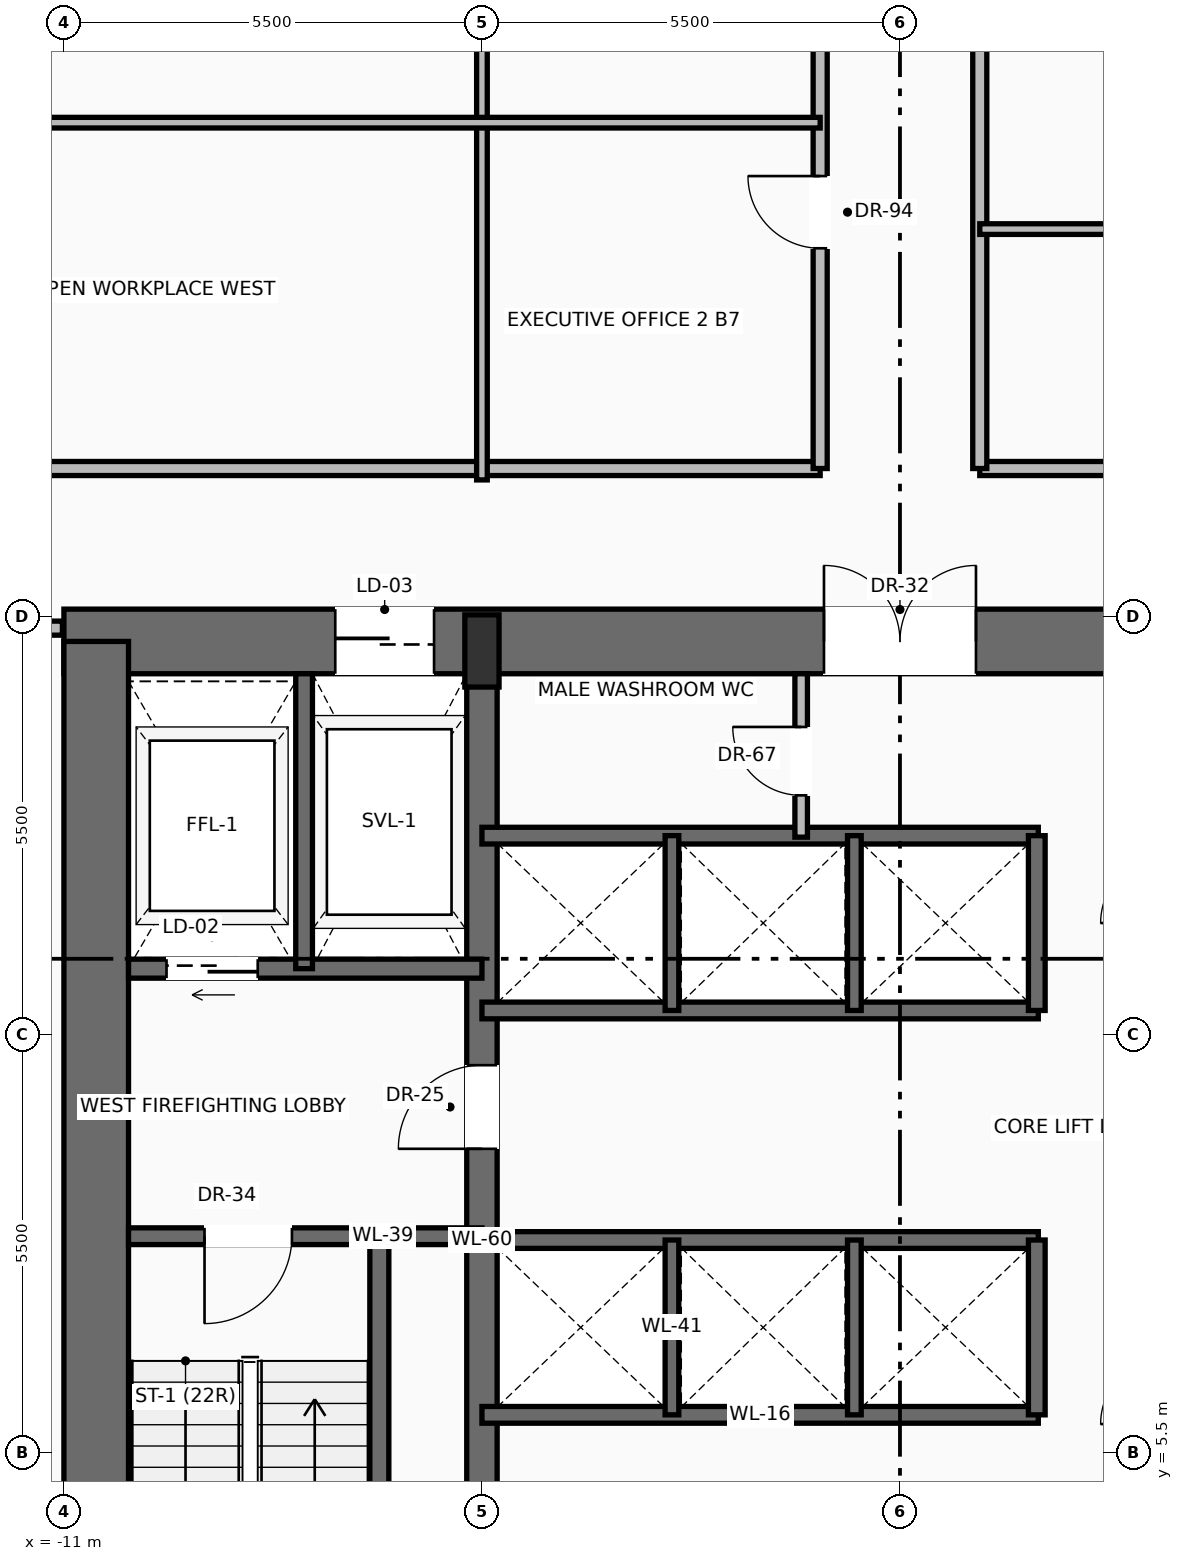
"""IFC4 building model, lengths in metres.
Left out: names, types, materials, properties, quantities, classifications, styles, units other than length and angle.
Written with IfcOpenShell. Run it as: python <this file> out.ifc"""

import sys

from ifc_helpers import new_model, si_unit, direction, frame, frame_2d, origin, origin_2d, place, context, subcontext, project, spatial, rectangle, extrude, source, transform, mapped, element, fill, save


model = new_model("IFC4")
c1 = context("Model", 3, precision=1e-05, world=origin(), true_north=direction((0.0, 1.0)))
c2 = subcontext(c1, "Body", "Model", "MODEL_VIEW")
j1 = project(units=[si_unit("LENGTHUNIT", "METRE"), si_unit("PLANEANGLEUNIT", "RADIAN")], contexts=[c1])
p1 = place(None, origin())
s1 = spatial("IfcSite", under=j1, at=p1, CompositionType="ELEMENT")
p2 = place(p1, origin())
s2 = spatial("IfcBuilding", under=s1, at=p2, CompositionType="ELEMENT")
p3 = place(p2, frame((0.0, 0.0, 27.5)))
s3 = spatial("IfcBuildingStorey", under=s2, at=p3, CompositionType="ELEMENT", Elevation=27.5)
p4 = place(p3, frame((-11.0, 16.175, 0.0), z_axis=(0.0, 0.0, 1.0), x_axis=(1.0, 0.0, 0.0)))
e1 = element("IfcWall", 1, at=p4, inside=s3, PredefinedType="SHEAR", context=c2, shape_type="SweptSolid", body=[
    extrude(rectangle(XDim=22.0, YDim=0.85, at=frame_2d((11.0, 0.0))), origin(), (0.0, 0.0, 1.0), 3.45),
])
p5 = place(p4, frame((3.57, 0.0, 0.0)))
e2 = element("IfcOpeningElement", 2, at=p5, cuts=e1, PredefinedType="OPENING", context=c2, shape_type="SweptSolid", body=[
    extrude(rectangle(XDim=1.3, YDim=2.3, at=frame_2d((0.65, 1.15))), frame((0.0, 0.435, 0.0), z_axis=(0.0, -1.0, 0.0), x_axis=(1.0, 0.0, 0.0)), (0.0, 0.0, 1.0), 0.87),
])
p6 = place(p4, frame((10.0, 0.0, 0.0)))
e3 = element("IfcOpeningElement", 3, at=p6, cuts=e1, PredefinedType="OPENING", context=c2, shape_type="SweptSolid", body=[
    extrude(rectangle(XDim=2.0, YDim=2.4, at=frame_2d((1.0, 1.2))), frame((0.0, 0.435, 0.0), z_axis=(0.0, -1.0, 0.0), x_axis=(1.0, 0.0, 0.0)), (0.0, 0.0, 1.0), 0.87),
])
p7 = place(p3, frame((-10.575, 0.425, 0.0), z_axis=(0.0, 0.0, 1.0), x_axis=(0.0, 1.0, 0.0)))
e4 = element("IfcWall", 4, at=p7, inside=s3, PredefinedType="SHEAR", context=c2, shape_type="SweptSolid", body=[
    extrude(rectangle(XDim=15.75, YDim=0.85, at=frame_2d((7.875, 0.0))), origin(), (0.0, 0.0, 1.0), 3.45),
])
p8 = place(p3, frame((-5.5, 0.425, 0.0), z_axis=(0.0, 0.0, 1.0), x_axis=(0.0, 1.0, 0.0)))
e5 = element("IfcWall", 5, at=p8, inside=s3, PredefinedType="SHEAR", context=c2, shape_type="SweptSolid", body=[
    extrude(rectangle(XDim=15.75, YDim=0.4, at=frame_2d((7.875, 0.0))), origin(), (0.0, 0.0, 1.0), 3.45),
])
p9 = place(p8, frame((9.075, 0.0, 0.0)))
e6 = element("IfcOpeningElement", 6, at=p9, cuts=e5, PredefinedType="OPENING", context=c2, shape_type="SweptSolid", body=[
    extrude(rectangle(XDim=1.1, YDim=2.2, at=frame_2d((0.55, 1.1))), frame((0.0, 0.21, 0.0), z_axis=(0.0, -1.0, 0.0), x_axis=(1.0, 0.0, 0.0)), (0.0, 0.0, 1.0), 0.42),
])
m1 = source(origin(), c2, "Body", "SweptSolid", [
    extrude(rectangle(XDim=0.45, YDim=0.95, at=origin_2d()), origin(), (0.0, 0.0, 1.0), 3.7),
])
p10 = place(p3, frame((-5.5, 16.05, 0.0), z_axis=(0.0, 0.0, 1.0), x_axis=(1.0, 0.0, 0.0)))
e7 = element("IfcColumn", 7, at=p10, inside=s3, PredefinedType="PILASTER", context=c2, shape_type="MappedRepresentation", body=[
    mapped(m1, transform((0.0, 0.0, 0.0), scale=1.0)),
])
p11 = place(p3, frame((-6.85, 0.85, 0.0), z_axis=(0.0, 0.0, 1.0), x_axis=(0.0, 1.0, 0.0)))
e8 = element("IfcWall", 8, at=p11, inside=s3, PredefinedType="SOLIDWALL", context=c2, shape_type="SweptSolid", body=[
    extrude(rectangle(XDim=7.5, YDim=0.25, at=frame_2d((3.75, 0.0))), origin(), (0.0, 0.0, 1.0), 3.45),
])
p12 = place(p3, frame((-5.5, 8.35, 0.0), z_axis=(0.0, 0.0, 1.0), x_axis=(-1.0, 0.0, 0.0)))
e9 = element("IfcWall", 9, at=p12, inside=s3, PredefinedType="SOLIDWALL", context=c2, shape_type="SweptSolid", body=[
    extrude(rectangle(XDim=4.65, YDim=0.22, at=frame_2d((2.325, 0.0))), origin(), (0.0, 0.0, 1.0), 3.45),
])
p13 = place(p12, frame((2.5, 0.0, 0.0)))
e10 = element("IfcOpeningElement", 10, at=p13, cuts=e9, PredefinedType="OPENING", context=c2, shape_type="SweptSolid", body=[
    extrude(rectangle(XDim=1.15, YDim=2.2, at=frame_2d((0.575, 1.1))), frame((0.0, 0.12, 0.0), z_axis=(0.0, -1.0, 0.0), x_axis=(1.0, 0.0, 0.0)), (0.0, 0.0, 1.0), 0.24),
])
p14 = place(p3, frame((-5.5, 11.87, 0.0), z_axis=(0.0, 0.0, 1.0), x_axis=(-1.0, 0.0, 0.0)))
e11 = element("IfcWall", 11, at=p14, inside=s3, PredefinedType="SOLIDWALL", context=c2, shape_type="SweptSolid", body=[
    extrude(rectangle(XDim=4.65, YDim=0.25, at=frame_2d((2.325, 0.0))), origin(), (0.0, 0.0, 1.0), 3.45),
])
p15 = place(p14, frame((2.95, 0.0, 0.0)))
e12 = element("IfcOpeningElement", 12, at=p15, cuts=e11, PredefinedType="OPENING", context=c2, shape_type="SweptSolid", body=[
    extrude(rectangle(XDim=1.2, YDim=2.25, at=frame_2d((0.6, 1.125))), frame((0.0, 0.135, 0.0), z_axis=(0.0, -1.0, 0.0), x_axis=(1.0, 0.0, 0.0)), (0.0, 0.0, 1.0), 0.27),
])
p16 = place(p3, frame((-7.84, 11.87, 0.0), z_axis=(0.0, 0.0, 1.0), x_axis=(0.0, 1.0, 0.0)))
e13 = element("IfcWall", 13, at=p16, inside=s3, PredefinedType="SOLIDWALL", context=c2, shape_type="SweptSolid", body=[
    extrude(rectangle(XDim=3.88, YDim=0.22, at=frame_2d((1.94, 0.0))), origin(), (0.0, 0.0, 1.0), 3.45),
])
for number, where, z_axis, x_axis in (
    (14, (-5.5, 6.0, 0.0), (0.0, 0.0, 1.0), (1.0, 0.0, 0.0)),
    (15, (-5.5, 8.3, 0.0), (0.0, 0.0, 1.0), (1.0, 0.0, 0.0)),
):
    element("IfcWall", number, at=place(p3, frame(where, z_axis=z_axis, x_axis=x_axis)), inside=s3, PredefinedType="SOLIDWALL", context=c2, shape_type="SweptSolid", body=[
        extrude(rectangle(XDim=7.32, YDim=0.22, at=frame_2d((3.66, 0.0))), origin(), (0.0, 0.0, 1.0), 3.45),
    ])
p17 = place(p3, frame((1.8, 6.0, 0.0), z_axis=(0.0, 0.0, 1.0), x_axis=(0.0, 1.0, 0.0)))
e16 = element("IfcWall", 16, at=p17, inside=s3, PredefinedType="SOLIDWALL", context=c2, shape_type="SweptSolid", body=[
    extrude(rectangle(XDim=2.3, YDim=0.22, at=frame_2d((1.15, 0.0))), origin(), (0.0, 0.0, 1.0), 3.45),
])
for number, where, z_axis, x_axis in (
    (17, (-3.0, 6.0, 0.0), (0.0, 0.0, 1.0), (0.0, 1.0, 0.0)),
    (18, (-0.6, 6.0, 0.0), (0.0, 0.0, 1.0), (0.0, 1.0, 0.0)),
):
    element("IfcWall", number, at=place(p3, frame(where, z_axis=z_axis, x_axis=x_axis)), inside=s3, PredefinedType="SOLIDWALL", context=c2, shape_type="SweptSolid", body=[
        extrude(rectangle(XDim=2.3, YDim=0.18, at=frame_2d((1.15, 0.0))), origin(), (0.0, 0.0, 1.0), 3.45),
    ])
for number, where, z_axis, x_axis in (
    (19, (-5.5, 11.32, 0.0), (0.0, 0.0, 1.0), (1.0, 0.0, 0.0)),
    (20, (-5.5, 13.62, 0.0), (0.0, 0.0, 1.0), (1.0, 0.0, 0.0)),
):
    element("IfcWall", number, at=place(p3, frame(where, z_axis=z_axis, x_axis=x_axis)), inside=s3, PredefinedType="SOLIDWALL", context=c2, shape_type="SweptSolid", body=[
        extrude(rectangle(XDim=7.32, YDim=0.22, at=frame_2d((3.66, 0.0))), origin(), (0.0, 0.0, 1.0), 3.45),
    ])
p18 = place(p3, frame((1.8, 11.32, 0.0), z_axis=(0.0, 0.0, 1.0), x_axis=(0.0, 1.0, 0.0)))
e21 = element("IfcWall", 21, at=p18, inside=s3, PredefinedType="SOLIDWALL", context=c2, shape_type="SweptSolid", body=[
    extrude(rectangle(XDim=2.3, YDim=0.22, at=frame_2d((1.15, 0.0))), origin(), (0.0, 0.0, 1.0), 3.45),
])
for number, where, z_axis, x_axis in (
    (22, (-3.0, 11.32, 0.0), (0.0, 0.0, 1.0), (0.0, 1.0, 0.0)),
    (23, (-0.6, 11.32, 0.0), (0.0, 0.0, 1.0), (0.0, 1.0, 0.0)),
):
    element("IfcWall", number, at=place(p3, frame(where, z_axis=z_axis, x_axis=x_axis)), inside=s3, PredefinedType="SOLIDWALL", context=c2, shape_type="SweptSolid", body=[
        extrude(rectangle(XDim=2.3, YDim=0.18, at=frame_2d((1.15, 0.0))), origin(), (0.0, 0.0, 1.0), 3.45),
    ])
p19 = place(p3, frame((-1.3, 13.6, 0.0), z_axis=(0.0, 0.0, 1.0), x_axis=(0.0, 1.0, 0.0)))
e24 = element("IfcWall", 24, at=p19, inside=s3, PredefinedType="PARTITIONING", context=c2, shape_type="SweptSolid", body=[
    extrude(rectangle(XDim=2.15, YDim=0.165, at=frame_2d((1.075, 0.0))), origin(), (0.0, 0.0, 1.0), 3.442),
])
p20 = place(p19, frame((0.55, 0.0, 0.0)))
e25 = element("IfcOpeningElement", 25, at=p20, cuts=e24, PredefinedType="OPENING", context=c2, shape_type="SweptSolid", body=[
    extrude(rectangle(XDim=0.9, YDim=2.1, at=frame_2d((0.45, 1.05))), frame((0.0, 0.093, 0.0), z_axis=(0.0, -1.0, 0.0), x_axis=(1.0, 0.0, 0.0)), (0.0, 0.0, 1.0), 0.185),
])
p21 = place(p3, frame((-25.333, 16.35, 0.0), z_axis=(0.0, 0.0, 1.0), x_axis=(1.0, 0.0, 0.0)))
e26 = element("IfcWall", 26, at=p21, inside=s3, PredefinedType="PARTITIONING", context=c2, shape_type="SweptSolid", body=[
    extrude(rectangle(XDim=14.313, YDim=0.185, at=frame_2d((7.157, 0.0))), origin(), (0.0, 0.0, 1.0), 2.747),
])
p22 = place(p21, frame((6.0, 0.0, 0.0)))
e27 = element("IfcOpeningElement", 27, at=p22, cuts=e26, PredefinedType="OPENING", context=c2, shape_type="SweptSolid", body=[
    extrude(rectangle(XDim=0.95, YDim=2.2, at=frame_2d((0.475, 1.1))), frame((0.0, 0.103, 0.0), z_axis=(0.0, -1.0, 0.0), x_axis=(1.0, 0.0, 0.0)), (0.0, 0.0, 1.0), 0.205),
])
p23 = place(p3, frame((-23.9, 18.45, 0.0), z_axis=(0.0, 0.0, 1.0), x_axis=(1.0, 0.0, 0.0)))
e28 = element("IfcWall", 28, at=p23, inside=s3, PredefinedType="PARTITIONING", context=c2, shape_type="SweptSolid", body=[
    extrude(rectangle(XDim=22.85, YDim=0.185, at=frame_2d((11.425, 0.0))), origin(), (0.0, 0.0, 1.0), 2.747),
])
p24 = place(p23, frame((9.842, 0.0, 0.0)))
e29 = element("IfcOpeningElement", 29, at=p24, cuts=e28, PredefinedType="OPENING", context=c2, shape_type="SweptSolid", body=[
    extrude(rectangle(XDim=0.95, YDim=2.2, at=frame_2d((0.475, 1.1))), frame((0.0, 0.103, 0.0), z_axis=(0.0, -1.0, 0.0), x_axis=(1.0, 0.0, 0.0)), (0.0, 0.0, 1.0), 0.205),
])
p25 = place(p3, frame((1.05, 18.45, 0.0), z_axis=(0.0, 0.0, 1.0), x_axis=(1.0, 0.0, 0.0)))
e30 = element("IfcWall", 30, at=p25, inside=s3, PredefinedType="PARTITIONING", context=c2, shape_type="SweptSolid", body=[
    extrude(rectangle(XDim=22.85, YDim=0.185, at=frame_2d((11.425, 0.0))), origin(), (0.0, 0.0, 1.0), 2.747),
])
p26 = place(p25, frame((12.059, 0.0, 0.0)))
e31 = element("IfcOpeningElement", 31, at=p26, cuts=e30, PredefinedType="OPENING", context=c2, shape_type="SweptSolid", body=[
    extrude(rectangle(XDim=0.95, YDim=2.2, at=frame_2d((0.475, 1.1))), frame((0.0, 0.103, 0.0), z_axis=(0.0, -1.0, 0.0), x_axis=(1.0, 0.0, 0.0)), (0.0, 0.0, 1.0), 0.205),
])
p27 = place(p3, frame((-1.05, 18.45, 0.0), z_axis=(0.0, 0.0, 1.0), x_axis=(0.0, 1.0, 0.0)))
e32 = element("IfcWall", 32, at=p27, inside=s3, PredefinedType="PARTITIONING", context=c2, shape_type="SweptSolid", body=[
    extrude(rectangle(XDim=14.05, YDim=0.185, at=frame_2d((7.025, 0.0))), origin(), (0.0, 0.0, 1.0), 2.747),
])
p28 = place(p27, frame((2.897, 0.0, 0.0)))
e33 = element("IfcOpeningElement", 33, at=p28, cuts=e32, PredefinedType="OPENING", context=c2, shape_type="SweptSolid", body=[
    extrude(rectangle(XDim=0.95, YDim=2.2, at=frame_2d((0.475, 1.1))), frame((0.0, 0.103, 0.0), z_axis=(0.0, -1.0, 0.0), x_axis=(1.0, 0.0, 0.0)), (0.0, 0.0, 1.0), 0.205),
])
p29 = place(p27, frame((8.564, 0.0, 0.0)))
e34 = element("IfcOpeningElement", 34, at=p29, cuts=e32, PredefinedType="OPENING", context=c2, shape_type="SweptSolid", body=[
    extrude(rectangle(XDim=0.95, YDim=2.2, at=frame_2d((0.475, 1.1))), frame((0.0, 0.103, 0.0), z_axis=(0.0, -1.0, 0.0), x_axis=(1.0, 0.0, 0.0)), (0.0, 0.0, 1.0), 0.205),
])
p30 = place(p3, frame((1.05, 18.45, 0.0), z_axis=(0.0, 0.0, 1.0), x_axis=(0.0, 1.0, 0.0)))
e35 = element("IfcWall", 35, at=p30, inside=s3, PredefinedType="PARTITIONING", context=c2, shape_type="SweptSolid", body=[
    extrude(rectangle(XDim=14.05, YDim=0.185, at=frame_2d((7.025, 0.0))), origin(), (0.0, 0.0, 1.0), 2.747),
])
p31 = place(p30, frame((8.498, 0.0, 0.0)))
e36 = element("IfcOpeningElement", 36, at=p31, cuts=e35, PredefinedType="OPENING", context=c2, shape_type="SweptSolid", body=[
    extrude(rectangle(XDim=0.95, YDim=2.2, at=frame_2d((0.475, 1.1))), frame((0.0, 0.103, 0.0), z_axis=(0.0, -1.0, 0.0), x_axis=(1.0, 0.0, 0.0)), (0.0, 0.0, 1.0), 0.205),
])
p32 = place(p3, frame((-5.5, 18.3, 0.0), z_axis=(0.0, 0.0, 1.0), x_axis=(0.0, 1.0, 0.0)))
e37 = element("IfcWall", 37, at=p32, inside=s3, PredefinedType="PARTITIONING", context=c2, shape_type="SweptSolid", body=[
    extrude(rectangle(XDim=13.2, YDim=0.14, at=frame_2d((6.6, 0.0))), origin(), (0.0, 0.0, 1.0), 2.747),
])
p33 = place(p3, frame((-20.796, 23.0, 0.0), z_axis=(0.0, 0.0, 1.0), x_axis=(1.0, 0.0, 0.0)))
e38 = element("IfcWall", 38, at=p33, inside=s3, PredefinedType="PARTITIONING", context=c2, shape_type="SweptSolid", body=[
    extrude(rectangle(XDim=19.746, YDim=0.14, at=frame_2d((9.873, 0.0))), origin(), (0.0, 0.0, 1.0), 2.747),
])
p34 = place(p33, frame((7.396, 0.0, 0.0)))
e39 = element("IfcOpeningElement", 39, at=p34, cuts=e38, PredefinedType="OPENING", context=c2, shape_type="SweptSolid", body=[
    extrude(rectangle(XDim=0.95, YDim=2.2, at=frame_2d((0.475, 1.1))), frame((0.0, 0.08, 0.0), z_axis=(0.0, -1.0, 0.0), x_axis=(1.0, 0.0, 0.0)), (0.0, 0.0, 1.0), 0.16),
])
p35 = place(p3, frame((1.05, 21.6, 0.0), z_axis=(0.0, 0.0, 1.0), x_axis=(1.0, 0.0, 0.0)))
e40 = element("IfcWall", 40, at=p35, inside=s3, PredefinedType="PARTITIONING", context=c2, shape_type="SweptSolid", body=[
    extrude(rectangle(XDim=20.701, YDim=0.14, at=frame_2d((10.351, 0.0))), origin(), (0.0, 0.0, 1.0), 2.747),
])
m2 = source(origin(), c2, "Body", "SweptSolid", [
    extrude(rectangle(XDim=1.15, YDim=2.2, at=frame_2d((0.575, 1.1))), frame((0.0, 0.025, 0.0), z_axis=(0.0, -1.0, 0.0), x_axis=(1.0, 0.0, 0.0)), (0.0, 0.0, 1.0), 0.05),
])
p36 = place(p13, origin())
e41 = element("IfcDoor", 41, at=p36, inside=s3, OperationType="SINGLE_SWING_RIGHT", PredefinedType="DOOR", context=c2, shape_type="MappedRepresentation", body=[
    mapped(m2, transform((0.0, 0.0, 0.0), scale=1.0)),
])
fill(e10, e41)
m3 = source(origin(), c2, "Body", "SweptSolid", [
    extrude(rectangle(XDim=1.1, YDim=2.2, at=frame_2d((0.55, 1.1))), frame((0.0, 0.025, 0.0), z_axis=(0.0, -1.0, 0.0), x_axis=(1.0, 0.0, 0.0)), (0.0, 0.0, 1.0), 0.05),
])
p37 = place(p9, origin())
e42 = element("IfcDoor", 42, at=p37, inside=s3, OperationType="SINGLE_SWING_LEFT", PredefinedType="DOOR", context=c2, shape_type="MappedRepresentation", body=[
    mapped(m3, transform((0.0, 0.0, 0.0), scale=1.0)),
])
fill(e6, e42)
m4 = source(origin(), c2, "Body", "SweptSolid", [
    extrude(rectangle(XDim=1.2, YDim=2.25, at=frame_2d((0.6, 1.125))), frame((0.0, 0.025, 0.0), z_axis=(0.0, -1.0, 0.0), x_axis=(1.0, 0.0, 0.0)), (0.0, 0.0, 1.0), 0.05),
])
p38 = place(p15, origin())
e43 = element("IfcDoor", 43, at=p38, inside=s3, OperationType="SLIDING_TO_LEFT", PredefinedType="DOOR", context=c2, shape_type="MappedRepresentation", body=[
    mapped(m4, transform((0.0, 0.0, 0.0), scale=1.0)),
])
fill(e12, e43)
m5 = source(origin(), c2, "Body", "SweptSolid", [
    extrude(rectangle(XDim=1.3, YDim=2.3, at=frame_2d((0.65, 1.15))), frame((0.0, 0.025, 0.0), z_axis=(0.0, -1.0, 0.0), x_axis=(1.0, 0.0, 0.0)), (0.0, 0.0, 1.0), 0.05),
])
p39 = place(p5, origin())
e44 = element("IfcDoor", 44, at=p39, inside=s3, OperationType="SLIDING_TO_RIGHT", PredefinedType="DOOR", context=c2, shape_type="MappedRepresentation", body=[
    mapped(m5, transform((0.0, 0.0, 0.0), scale=1.0)),
])
fill(e2, e44)
m6 = source(origin(), c2, "Body", "SweptSolid", [
    extrude(rectangle(XDim=2.0, YDim=2.4, at=frame_2d((1.0, 1.2))), frame((0.0, 0.025, 0.0), z_axis=(0.0, -1.0, 0.0), x_axis=(1.0, 0.0, 0.0)), (0.0, 0.0, 1.0), 0.05),
])
p40 = place(p6, origin())
e45 = element("IfcDoor", 45, at=p40, inside=s3, OperationType="DOUBLE_DOOR_SINGLE_SWING", PredefinedType="DOOR", context=c2, shape_type="MappedRepresentation", body=[
    mapped(m6, transform((0.0, 0.0, 0.0), scale=1.0)),
])
fill(e3, e45)
m7 = source(origin(), c2, "Body", "SweptSolid", [
    extrude(rectangle(XDim=0.9, YDim=2.1, at=frame_2d((0.45, 1.05))), frame((0.0, 0.025, 0.0), z_axis=(0.0, -1.0, 0.0), x_axis=(1.0, 0.0, 0.0)), (0.0, 0.0, 1.0), 0.05),
])
p41 = place(p20, origin())
e46 = element("IfcDoor", 46, at=p41, inside=s3, OperationType="SINGLE_SWING_RIGHT", PredefinedType="DOOR", context=c2, shape_type="MappedRepresentation", body=[
    mapped(m7, transform((0.0, 0.0, 0.0), scale=1.0)),
])
fill(e25, e46)
m8 = source(origin(), c2, "Body", "SweptSolid", [
    extrude(rectangle(XDim=0.95, YDim=2.2, at=frame_2d((0.475, 1.1))), frame((0.0, 0.025, 0.0), z_axis=(0.0, -1.0, 0.0), x_axis=(1.0, 0.0, 0.0)), (0.0, 0.0, 1.0), 0.05),
])
p42 = place(p28, origin())
e47 = element("IfcDoor", 47, at=p42, inside=s3, OperationType="SINGLE_SWING_RIGHT", PredefinedType="DOOR", context=c2, shape_type="MappedRepresentation", body=[
    mapped(m8, transform((0.0, 0.0, 0.0), scale=1.0)),
])
fill(e33, e47)
save(model, sys.argv[1])
